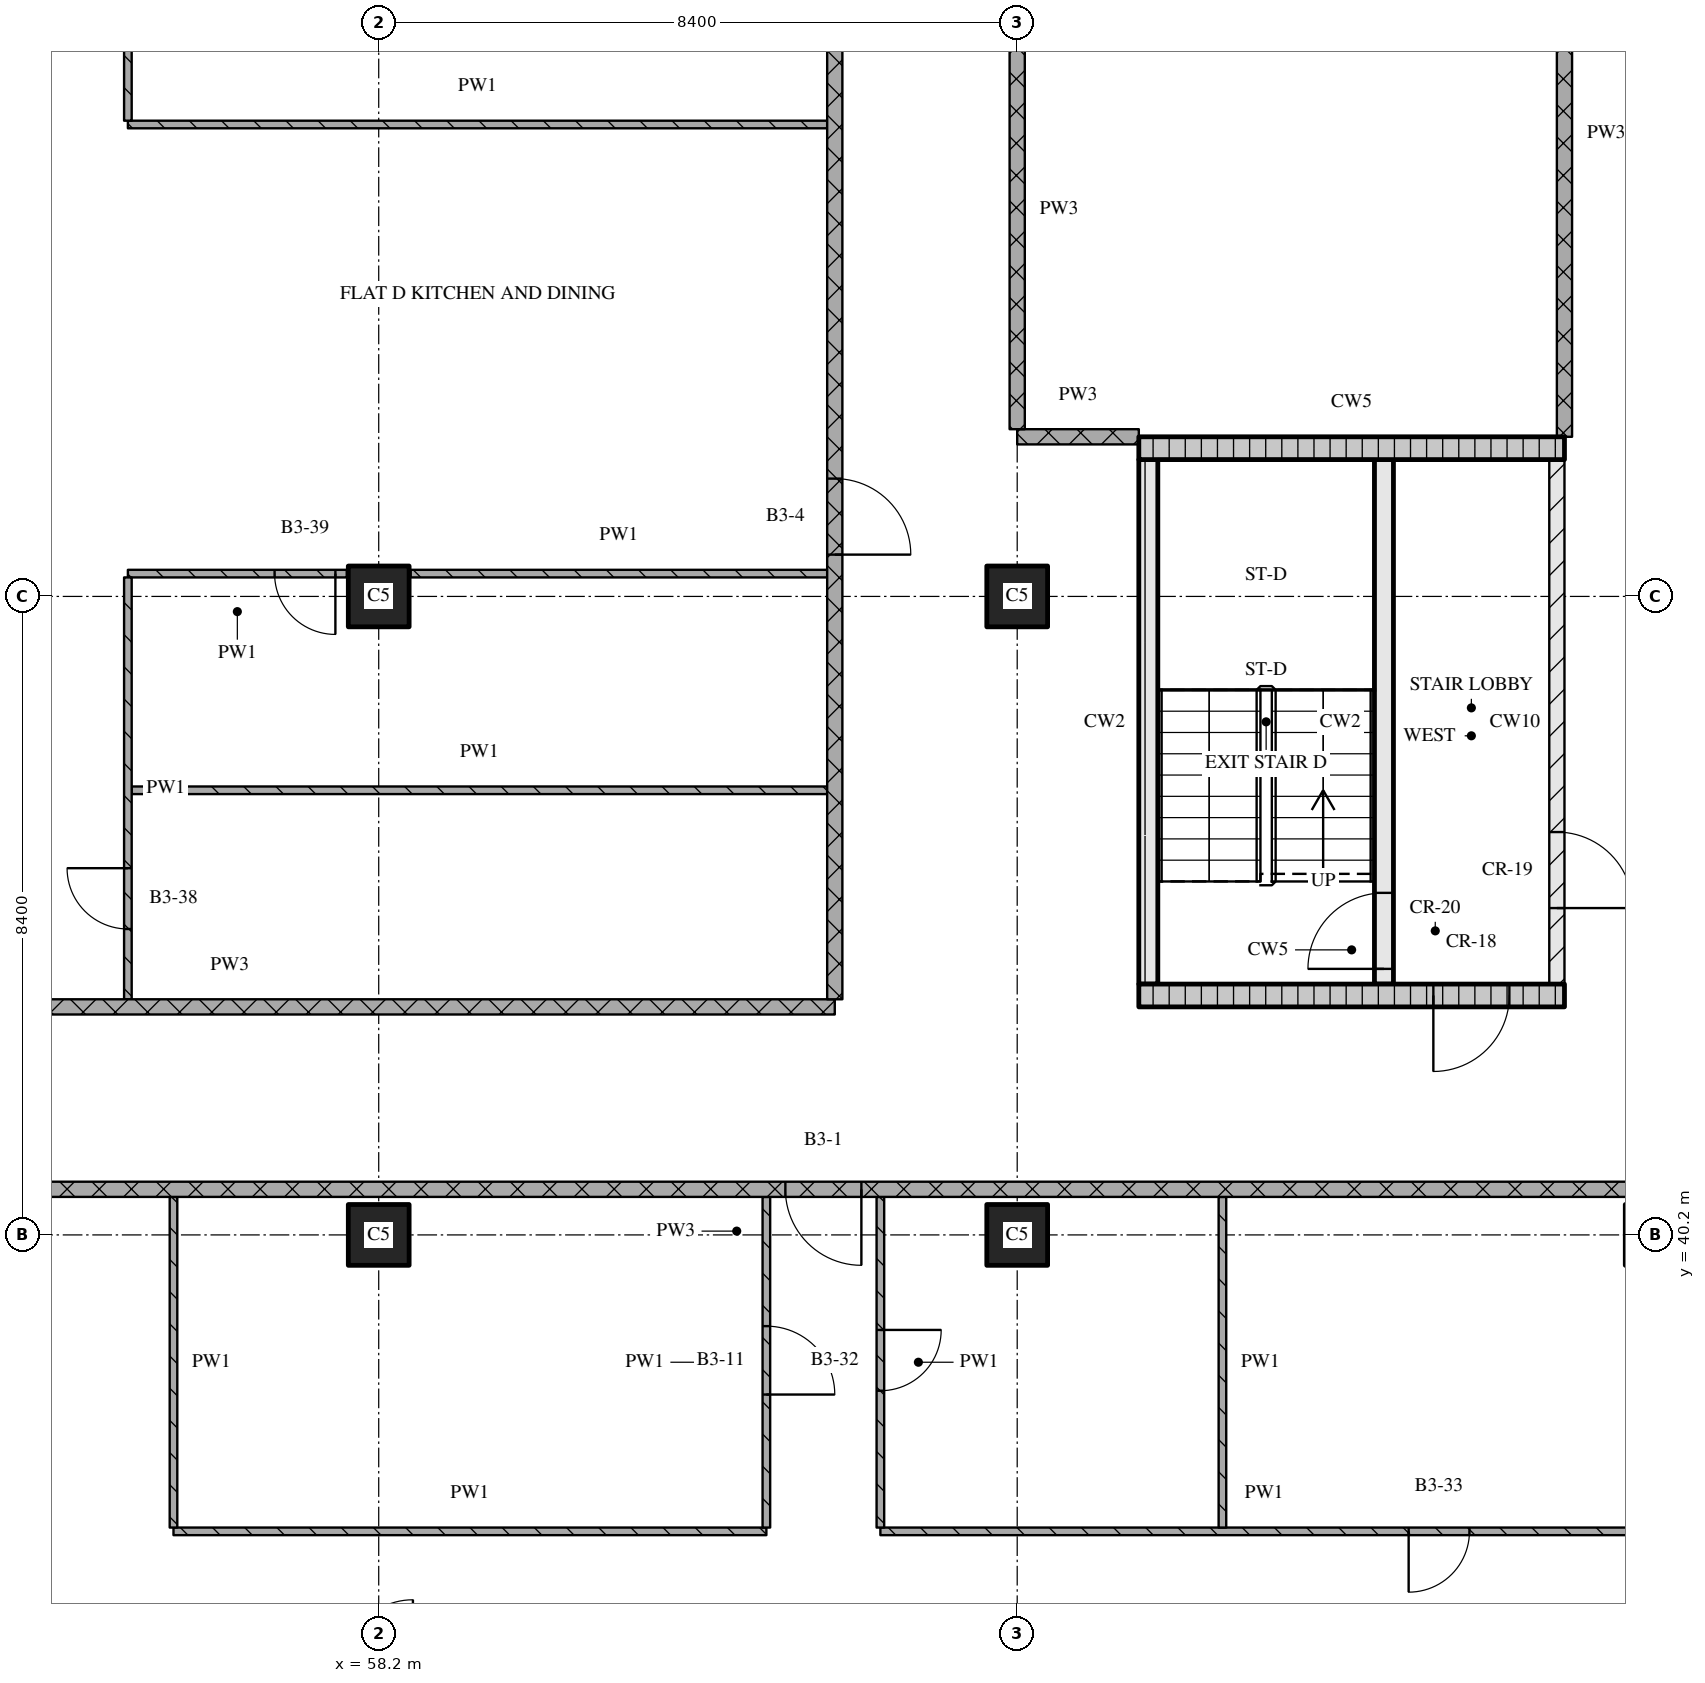
"""IFC4 building model, lengths in metres.
Left out: names, types, materials, properties, quantities, classifications, styles, units other than length and angle.
Written with IfcOpenShell. Run it as: python <this file> out.ifc"""

import sys

from ifc_helpers import new_model, si_unit, direction, frame, frame_2d, origin, origin_2d, place, context, subcontext, project, spatial, rectangle, extrude, element, fill, save


model = new_model("IFC4")
c1 = context("Model", 3, precision=1e-05, world=origin(), true_north=direction((0.0, 1.0)))
c2 = subcontext(c1, "Body", "Model", "MODEL_VIEW")
j1 = project(units=[si_unit("LENGTHUNIT", "METRE"), si_unit("PLANEANGLEUNIT", "RADIAN")], contexts=[c1])
p1 = place(None, origin())
s1 = spatial("IfcSite", under=j1, at=p1, CompositionType="ELEMENT")
p2 = place(p1, origin())
s2 = spatial("IfcBuilding", under=s1, at=p2, CompositionType="ELEMENT")
p3 = place(p2, frame((0.0, 0.0, 116.85)))
s3 = spatial("IfcBuildingStorey", under=s2, at=p3, CompositionType="ELEMENT", Elevation=116.85)
for number, where, z_axis, x_axis in (
    (1, (58.2, 40.2, 0.0), (0.0, 0.0, 1.0), (1.0, 0.0, 0.0)),
    (2, (58.2, 48.6, 0.0), (0.0, 0.0, 1.0), (1.0, 0.0, 0.0)),
    (3, (66.6, 40.2, 0.0), (0.0, 0.0, 1.0), (1.0, 0.0, 0.0)),
    (4, (66.6, 48.6, 0.0), (0.0, 0.0, 1.0), (1.0, 0.0, 0.0)),
    (5, (75.0, 40.2, 0.0), (0.0, 0.0, 1.0), (1.0, 0.0, 0.0)),
):
    element("IfcColumn", number, at=place(p3, frame(where, z_axis=z_axis, x_axis=x_axis)), inside=s3, PredefinedType="COLUMN", context=c2, shape_type="SweptSolid", body=[
        extrude(rectangle(XDim=0.8, YDim=0.8, at=origin_2d()), origin(), (0.0, 0.0, 1.0), 3.6),
    ])
p4 = place(p3, frame((68.2, 43.35, 0.0), z_axis=(0.0, 0.0, 1.0), x_axis=(1.0, 0.0, 0.0)))
e6 = element("IfcWall", 6, at=p4, inside=s3, PredefinedType="SOLIDWALL", context=c2, shape_type="SweptSolid", body=[
    extrude(rectangle(XDim=5.6, YDim=0.3, at=frame_2d((2.8, 0.0))), origin(), (0.0, 0.0, 1.0), 3.32),
])
p5 = place(p4, frame((3.875, 0.0, 0.0)))
e7 = element("IfcOpeningElement", 7, at=p5, cuts=e6, PredefinedType="OPENING", context=c2, shape_type="SweptSolid", body=[
    extrude(rectangle(XDim=1.0, YDim=2.1, at=frame_2d((0.5, 1.05))), frame((0.0, 0.16, 0.0), z_axis=(0.0, -1.0, 0.0), x_axis=(1.0, 0.0, 0.0)), (0.0, 0.0, 1.0), 0.32),
])
p6 = place(p3, frame((68.325, 43.5, 0.0), z_axis=(0.0, 0.0, 1.0), x_axis=(0.0, 1.0, 0.0)))
e8 = element("IfcWall", 8, at=p6, inside=s3, PredefinedType="SOLIDWALL", context=c2, shape_type="SweptSolid", body=[
    extrude(rectangle(XDim=6.9, YDim=0.25, at=frame_2d((3.45, 0.0))), origin(), (0.0, 0.0, 1.0), 3.32),
])
p7 = place(p3, frame((71.425, 43.5, 0.0), z_axis=(0.0, 0.0, 1.0), x_axis=(0.0, 1.0, 0.0)))
e9 = element("IfcWall", 9, at=p7, inside=s3, PredefinedType="SOLIDWALL", context=c2, shape_type="SweptSolid", body=[
    extrude(rectangle(XDim=6.9, YDim=0.25, at=frame_2d((3.45, 0.0))), origin(), (0.0, 0.0, 1.0), 3.32),
])
p8 = place(p7, frame((0.2, 0.0, 0.0)))
e10 = element("IfcOpeningElement", 10, at=p8, cuts=e9, PredefinedType="OPENING", context=c2, shape_type="SweptSolid", body=[
    extrude(rectangle(XDim=1.0, YDim=2.1, at=frame_2d((0.5, 1.05))), frame((0.0, 0.135, 0.0), z_axis=(0.0, -1.0, 0.0), x_axis=(1.0, 0.0, 0.0)), (0.0, 0.0, 1.0), 0.27),
])
p9 = place(p3, frame((73.7, 43.5, 0.0), z_axis=(0.0, 0.0, 1.0), x_axis=(0.0, 1.0, 0.0)))
e11 = element("IfcWall", 11, at=p9, inside=s3, PredefinedType="PARTITIONING", context=c2, shape_type="SweptSolid", body=[
    extrude(rectangle(XDim=6.9, YDim=0.2, at=frame_2d((3.45, 0.0))), origin(), (0.0, 0.0, 1.0), 3.32),
])
p10 = place(p9, frame((1.0, 0.0, 0.0)))
e12 = element("IfcOpeningElement", 12, at=p10, cuts=e11, PredefinedType="OPENING", context=c2, shape_type="SweptSolid", body=[
    extrude(rectangle(XDim=1.0, YDim=2.1, at=frame_2d((0.5, 1.05))), frame((0.0, 0.11, 0.0), z_axis=(0.0, -1.0, 0.0), x_axis=(1.0, 0.0, 0.0)), (0.0, 0.0, 1.0), 0.22),
])
p11 = place(p3, frame((68.2, 50.55, 0.0), z_axis=(0.0, 0.0, 1.0), x_axis=(1.0, 0.0, 0.0)))
e13 = element("IfcWall", 13, at=p11, inside=s3, PredefinedType="SOLIDWALL", context=c2, shape_type="SweptSolid", body=[
    extrude(rectangle(XDim=5.6, YDim=0.3, at=frame_2d((2.8, 0.0))), origin(), (0.0, 0.0, 1.0), 3.32),
])
p12 = place(p3, frame((55.5, 36.3, 0.0), z_axis=(0.0, 0.0, 1.0), x_axis=(1.0, 0.0, 0.0)))
e14 = element("IfcWall", 14, at=p12, inside=s3, PredefinedType="PARTITIONING", context=c2, shape_type="SweptSolid", body=[
    extrude(rectangle(XDim=7.8, YDim=0.1, at=frame_2d((3.9, 0.0))), origin(), (0.0, 0.0, 1.0), 3.32),
])
p13 = place(p3, frame((64.8, 36.3, 0.0), z_axis=(0.0, 0.0, 1.0), x_axis=(1.0, 0.0, 0.0)))
e15 = element("IfcWall", 15, at=p13, inside=s3, PredefinedType="PARTITIONING", context=c2, shape_type="SweptSolid", body=[
    extrude(rectangle(XDim=10.1, YDim=0.1, at=frame_2d((5.05, 0.0))), origin(), (0.0, 0.0, 1.0), 3.32),
])
p14 = place(p13, frame((6.95, 0.0, 0.0)))
e16 = element("IfcOpeningElement", 16, at=p14, cuts=e15, PredefinedType="OPENING", context=c2, shape_type="SweptSolid", body=[
    extrude(rectangle(XDim=0.8, YDim=2.1, at=frame_2d((0.4, 1.05))), frame((0.0, 0.06, 0.0), z_axis=(0.0, -1.0, 0.0), x_axis=(1.0, 0.0, 0.0)), (0.0, 0.0, 1.0), 0.12),
])
p15 = place(p3, frame((75.0, 40.8, 0.0), z_axis=(0.0, 0.0, 1.0), x_axis=(-1.0, 0.0, 0.0)))
e17 = element("IfcWall", 17, at=p15, inside=s3, PredefinedType="PARTITIONING", context=c2, shape_type="SweptSolid", body=[
    extrude(rectangle(XDim=24.18, YDim=0.2, at=frame_2d((12.09, 0.0))), origin(), (0.0, 0.0, 1.0), 3.32),
])
p16 = place(p15, frame((10.45, 0.0, 0.0)))
e18 = element("IfcOpeningElement", 18, at=p16, cuts=e17, PredefinedType="OPENING", context=c2, shape_type="SweptSolid", body=[
    extrude(rectangle(XDim=1.0, YDim=2.1, at=frame_2d((0.5, 1.05))), frame((0.0, 0.11, 0.0), z_axis=(0.0, -1.0, 0.0), x_axis=(1.0, 0.0, 0.0)), (0.0, 0.0, 1.0), 0.22),
])
p17 = place(p3, frame((48.28, 43.2, 0.0), z_axis=(0.0, 0.0, 1.0), x_axis=(1.0, 0.0, 0.0)))
e19 = element("IfcWall", 19, at=p17, inside=s3, PredefinedType="PARTITIONING", context=c2, shape_type="SweptSolid", body=[
    extrude(rectangle(XDim=15.92, YDim=0.2, at=frame_2d((7.96, 0.0))), origin(), (0.0, 0.0, 1.0), 3.32),
])
p18 = place(p3, frame((54.95, 46.05, 0.0), z_axis=(0.0, 0.0, 1.0), x_axis=(1.0, 0.0, 0.0)))
e20 = element("IfcWall", 20, at=p18, inside=s3, PredefinedType="PARTITIONING", context=c2, shape_type="SweptSolid", body=[
    extrude(rectangle(XDim=9.15, YDim=0.1, at=frame_2d((4.575, 0.0))), origin(), (0.0, 0.0, 1.0), 3.32),
])
p19 = place(p3, frame((57.78, 48.9, 0.0), z_axis=(0.0, 0.0, 1.0), x_axis=(-1.0, 0.0, 0.0)))
e21 = element("IfcWall", 21, at=p19, inside=s3, PredefinedType="PARTITIONING", context=c2, shape_type="SweptSolid", body=[
    extrude(rectangle(XDim=2.88, YDim=0.1, at=frame_2d((1.44, 0.0))), origin(), (0.0, 0.0, 1.0), 3.32),
])
p20 = place(p19, frame((0.15, 0.0, 0.0)))
e22 = element("IfcOpeningElement", 22, at=p20, cuts=e21, PredefinedType="OPENING", context=c2, shape_type="SweptSolid", body=[
    extrude(rectangle(XDim=0.8, YDim=2.1, at=frame_2d((0.4, 1.05))), frame((0.0, 0.06, 0.0), z_axis=(0.0, -1.0, 0.0), x_axis=(1.0, 0.0, 0.0)), (0.0, 0.0, 1.0), 0.12),
])
p21 = place(p3, frame((58.62, 48.9, 0.0), z_axis=(0.0, 0.0, 1.0), x_axis=(1.0, 0.0, 0.0)))
e23 = element("IfcWall", 23, at=p21, inside=s3, PredefinedType="PARTITIONING", context=c2, shape_type="SweptSolid", body=[
    extrude(rectangle(XDim=5.48, YDim=0.1, at=frame_2d((2.74, 0.0))), origin(), (0.0, 0.0, 1.0), 3.32),
])
p22 = place(p3, frame((66.6, 50.7, 0.0), z_axis=(0.0, 0.0, 1.0), x_axis=(1.0, 0.0, 0.0)))
e24 = element("IfcWall", 24, at=p22, inside=s3, PredefinedType="PARTITIONING", context=c2, shape_type="SweptSolid", body=[
    extrude(rectangle(XDim=1.6, YDim=0.2, at=frame_2d((0.8, 0.0))), origin(), (0.0, 0.0, 1.0), 3.32),
])
p23 = place(p3, frame((54.9, 54.809, 0.0), z_axis=(0.0, 0.0, 1.0), x_axis=(1.0, 0.0, 0.0)))
e25 = element("IfcWall", 25, at=p23, inside=s3, PredefinedType="PARTITIONING", context=c2, shape_type="SweptSolid", body=[
    extrude(rectangle(XDim=9.2, YDim=0.1, at=frame_2d((4.6, 0.0))), origin(), (0.0, 0.0, 1.0), 3.32),
])
p24 = place(p3, frame((54.9, 48.85, 0.0), z_axis=(0.0, 0.0, 1.0), x_axis=(0.0, -1.0, 0.0)))
e26 = element("IfcWall", 26, at=p24, inside=s3, PredefinedType="PARTITIONING", context=c2, shape_type="SweptSolid", body=[
    extrude(rectangle(XDim=5.55, YDim=0.1, at=frame_2d((2.775, 0.0))), origin(), (0.0, 0.0, 1.0), 3.32),
])
p25 = place(p24, frame((3.825, 0.0, 0.0)))
e27 = element("IfcOpeningElement", 27, at=p25, cuts=e26, PredefinedType="OPENING", context=c2, shape_type="SweptSolid", body=[
    extrude(rectangle(XDim=0.8, YDim=2.1, at=frame_2d((0.4, 1.05))), frame((0.0, 0.06, 0.0), z_axis=(0.0, -1.0, 0.0), x_axis=(1.0, 0.0, 0.0)), (0.0, 0.0, 1.0), 0.12),
])
p26 = place(p3, frame((54.9, 65.3, 0.0), z_axis=(0.0, 0.0, 1.0), x_axis=(0.0, -1.0, 0.0)))
e28 = element("IfcWall", 28, at=p26, inside=s3, PredefinedType="PARTITIONING", context=c2, shape_type="SweptSolid", body=[
    extrude(rectangle(XDim=10.441, YDim=0.1, at=frame_2d((5.221, 0.0))), origin(), (0.0, 0.0, 1.0), 3.32),
])
p27 = place(p26, frame((4.746, 0.0, 0.0)))
e29 = element("IfcOpeningElement", 29, at=p27, cuts=e28, PredefinedType="OPENING", context=c2, shape_type="SweptSolid", body=[
    extrude(rectangle(XDim=0.9, YDim=2.1, at=frame_2d((0.45, 1.05))), frame((0.0, 0.06, 0.0), z_axis=(0.0, -1.0, 0.0), x_axis=(1.0, 0.0, 0.0)), (0.0, 0.0, 1.0), 0.12),
])
p28 = place(p3, frame((55.5, 40.7, 0.0), z_axis=(0.0, 0.0, 1.0), x_axis=(0.0, -1.0, 0.0)))
e30 = element("IfcWall", 30, at=p28, inside=s3, PredefinedType="PARTITIONING", context=c2, shape_type="SweptSolid", body=[
    extrude(rectangle(XDim=4.35, YDim=0.1, at=frame_2d((2.175, 0.0))), origin(), (0.0, 0.0, 1.0), 3.32),
])
p29 = place(p3, frame((63.3, 36.35, 0.0), z_axis=(0.0, 0.0, 1.0), x_axis=(0.0, 1.0, 0.0)))
e31 = element("IfcWall", 31, at=p29, inside=s3, PredefinedType="PARTITIONING", context=c2, shape_type="SweptSolid", body=[
    extrude(rectangle(XDim=4.35, YDim=0.1, at=frame_2d((2.175, 0.0))), origin(), (0.0, 0.0, 1.0), 3.32),
])
p30 = place(p29, frame((1.75, 0.0, 0.0)))
e32 = element("IfcOpeningElement", 32, at=p30, cuts=e31, PredefinedType="OPENING", context=c2, shape_type="SweptSolid", body=[
    extrude(rectangle(XDim=0.9, YDim=2.1, at=frame_2d((0.45, 1.05))), frame((0.0, 0.06, 0.0), z_axis=(0.0, -1.0, 0.0), x_axis=(1.0, 0.0, 0.0)), (0.0, 0.0, 1.0), 0.12),
])
p31 = place(p3, frame((64.2, 43.3, 0.0), z_axis=(0.0, 0.0, 1.0), x_axis=(0.0, 1.0, 0.0)))
e33 = element("IfcWall", 33, at=p31, inside=s3, PredefinedType="PARTITIONING", context=c2, shape_type="SweptSolid", body=[
    extrude(rectangle(XDim=32.02, YDim=0.2, at=frame_2d((16.01, 0.0))), origin(), (0.0, 0.0, 1.0), 3.32),
])
p32 = place(p31, frame((5.85, 0.0, 0.0)))
e34 = element("IfcOpeningElement", 34, at=p32, cuts=e33, PredefinedType="OPENING", context=c2, shape_type="SweptSolid", body=[
    extrude(rectangle(XDim=1.0, YDim=2.1, at=frame_2d((0.5, 1.05))), frame((0.0, 0.11, 0.0), z_axis=(0.0, -1.0, 0.0), x_axis=(1.0, 0.0, 0.0)), (0.0, 0.0, 1.0), 0.22),
])
p33 = place(p31, frame((25.95, 0.0, 0.0)))
e35 = element("IfcOpeningElement", 35, at=p33, cuts=e33, PredefinedType="OPENING", context=c2, shape_type="SweptSolid", body=[
    extrude(rectangle(XDim=1.0, YDim=2.1, at=frame_2d((0.5, 1.05))), frame((0.0, 0.11, 0.0), z_axis=(0.0, -1.0, 0.0), x_axis=(1.0, 0.0, 0.0)), (0.0, 0.0, 1.0), 0.22),
])
p34 = place(p3, frame((64.8, 40.7, 0.0), z_axis=(0.0, 0.0, 1.0), x_axis=(0.0, -1.0, 0.0)))
e36 = element("IfcWall", 36, at=p34, inside=s3, PredefinedType="PARTITIONING", context=c2, shape_type="SweptSolid", body=[
    extrude(rectangle(XDim=4.35, YDim=0.1, at=frame_2d((2.175, 0.0))), origin(), (0.0, 0.0, 1.0), 3.32),
])
p35 = place(p34, frame((1.75, 0.0, 0.0)))
e37 = element("IfcOpeningElement", 37, at=p35, cuts=e36, PredefinedType="OPENING", context=c2, shape_type="SweptSolid", body=[
    extrude(rectangle(XDim=0.8, YDim=2.1, at=frame_2d((0.4, 1.05))), frame((0.0, 0.06, 0.0), z_axis=(0.0, -1.0, 0.0), x_axis=(1.0, 0.0, 0.0)), (0.0, 0.0, 1.0), 0.12),
])
p36 = place(p3, frame((66.6, 56.58, 0.0), z_axis=(0.0, 0.0, 1.0), x_axis=(0.0, -1.0, 0.0)))
e38 = element("IfcWall", 38, at=p36, inside=s3, PredefinedType="PARTITIONING", context=c2, shape_type="SweptSolid", body=[
    extrude(rectangle(XDim=5.78, YDim=0.2, at=frame_2d((2.89, 0.0))), origin(), (0.0, 0.0, 1.0), 3.32),
])
p37 = place(p3, frame((69.3, 40.7, 0.0), z_axis=(0.0, 0.0, 1.0), x_axis=(0.0, -1.0, 0.0)))
e39 = element("IfcWall", 39, at=p37, inside=s3, PredefinedType="PARTITIONING", context=c2, shape_type="SweptSolid", body=[
    extrude(rectangle(XDim=4.35, YDim=0.1, at=frame_2d((2.175, 0.0))), origin(), (0.0, 0.0, 1.0), 3.32),
])
p38 = place(p3, frame((73.8, 58.7, 0.0), z_axis=(0.0, 0.0, 1.0), x_axis=(0.0, -1.0, 0.0)))
e40 = element("IfcWall", 40, at=p38, inside=s3, PredefinedType="PARTITIONING", context=c2, shape_type="SweptSolid", body=[
    extrude(rectangle(XDim=8.0, YDim=0.2, at=frame_2d((4.0, 0.0))), origin(), (0.0, 0.0, 1.0), 3.32),
])
p39 = place(p5, origin())
e41 = element("IfcDoor", 41, at=p39, inside=s3, OperationType="SINGLE_SWING_RIGHT", PredefinedType="DOOR", context=c2, shape_type="SweptSolid", body=[
    extrude(rectangle(XDim=1.0, YDim=2.1, at=frame_2d((0.5, 1.05))), frame((0.0, 0.025, 0.0), z_axis=(0.0, -1.0, 0.0), x_axis=(1.0, 0.0, 0.0)), (0.0, 0.0, 1.0), 0.05),
])
fill(e7, e41)
p40 = place(p8, origin())
e42 = element("IfcDoor", 42, at=p40, inside=s3, OperationType="SINGLE_SWING_LEFT", PredefinedType="DOOR", context=c2, shape_type="SweptSolid", body=[
    extrude(rectangle(XDim=1.0, YDim=2.1, at=frame_2d((0.5, 1.05))), frame((0.0, 0.025, 0.0), z_axis=(0.0, -1.0, 0.0), x_axis=(1.0, 0.0, 0.0)), (0.0, 0.0, 1.0), 0.05),
])
fill(e10, e42)
p41 = place(p10, origin())
e43 = element("IfcDoor", 43, at=p41, inside=s3, OperationType="SINGLE_SWING_RIGHT", PredefinedType="DOOR", context=c2, shape_type="SweptSolid", body=[
    extrude(rectangle(XDim=1.0, YDim=2.1, at=frame_2d((0.5, 1.05))), frame((0.0, 0.025, 0.0), z_axis=(0.0, -1.0, 0.0), x_axis=(1.0, 0.0, 0.0)), (0.0, 0.0, 1.0), 0.05),
])
fill(e12, e43)
p42 = place(p14, origin())
e44 = element("IfcDoor", 44, at=p42, inside=s3, OperationType="SINGLE_SWING_RIGHT", PredefinedType="DOOR", context=c2, shape_type="SweptSolid", body=[
    extrude(rectangle(XDim=0.8, YDim=2.1, at=frame_2d((0.4, 1.05))), frame((0.0, 0.025, 0.0), z_axis=(0.0, -1.0, 0.0), x_axis=(1.0, 0.0, 0.0)), (0.0, 0.0, 1.0), 0.05),
])
fill(e16, e44)
p43 = place(p16, origin())
e45 = element("IfcDoor", 45, at=p43, inside=s3, OperationType="SINGLE_SWING_LEFT", PredefinedType="DOOR", context=c2, shape_type="SweptSolid", body=[
    extrude(rectangle(XDim=1.0, YDim=2.1, at=frame_2d((0.5, 1.05))), frame((0.0, 0.025, 0.0), z_axis=(0.0, -1.0, 0.0), x_axis=(1.0, 0.0, 0.0)), (0.0, 0.0, 1.0), 0.05),
])
fill(e18, e45)
p44 = place(p20, origin())
e46 = element("IfcDoor", 46, at=p44, inside=s3, OperationType="SINGLE_SWING_LEFT", PredefinedType="DOOR", context=c2, shape_type="SweptSolid", body=[
    extrude(rectangle(XDim=0.8, YDim=2.1, at=frame_2d((0.4, 1.05))), frame((0.0, 0.025, 0.0), z_axis=(0.0, -1.0, 0.0), x_axis=(1.0, 0.0, 0.0)), (0.0, 0.0, 1.0), 0.05),
])
fill(e22, e46)
p45 = place(p25, origin())
e47 = element("IfcDoor", 47, at=p45, inside=s3, OperationType="SINGLE_SWING_RIGHT", PredefinedType="DOOR", context=c2, shape_type="SweptSolid", body=[
    extrude(rectangle(XDim=0.8, YDim=2.1, at=frame_2d((0.4, 1.05))), frame((0.0, 0.025, 0.0), z_axis=(0.0, -1.0, 0.0), x_axis=(1.0, 0.0, 0.0)), (0.0, 0.0, 1.0), 0.05),
])
fill(e27, e47)
p46 = place(p30, origin())
e48 = element("IfcDoor", 48, at=p46, inside=s3, OperationType="SINGLE_SWING_RIGHT", PredefinedType="DOOR", context=c2, shape_type="SweptSolid", body=[
    extrude(rectangle(XDim=0.9, YDim=2.1, at=frame_2d((0.45, 1.05))), frame((0.0, 0.025, 0.0), z_axis=(0.0, -1.0, 0.0), x_axis=(1.0, 0.0, 0.0)), (0.0, 0.0, 1.0), 0.05),
])
fill(e32, e48)
p47 = place(p32, origin())
e49 = element("IfcDoor", 49, at=p47, inside=s3, OperationType="SINGLE_SWING_RIGHT", PredefinedType="DOOR", context=c2, shape_type="SweptSolid", body=[
    extrude(rectangle(XDim=1.0, YDim=2.1, at=frame_2d((0.5, 1.05))), frame((0.0, 0.025, 0.0), z_axis=(0.0, -1.0, 0.0), x_axis=(1.0, 0.0, 0.0)), (0.0, 0.0, 1.0), 0.05),
])
fill(e34, e49)
p48 = place(p35, origin())
e50 = element("IfcDoor", 50, at=p48, inside=s3, OperationType="SINGLE_SWING_LEFT", PredefinedType="DOOR", context=c2, shape_type="SweptSolid", body=[
    extrude(rectangle(XDim=0.8, YDim=2.1, at=frame_2d((0.4, 1.05))), frame((0.0, 0.025, 0.0), z_axis=(0.0, -1.0, 0.0), x_axis=(1.0, 0.0, 0.0)), (0.0, 0.0, 1.0), 0.05),
])
fill(e37, e50)
save(model, sys.argv[1])
